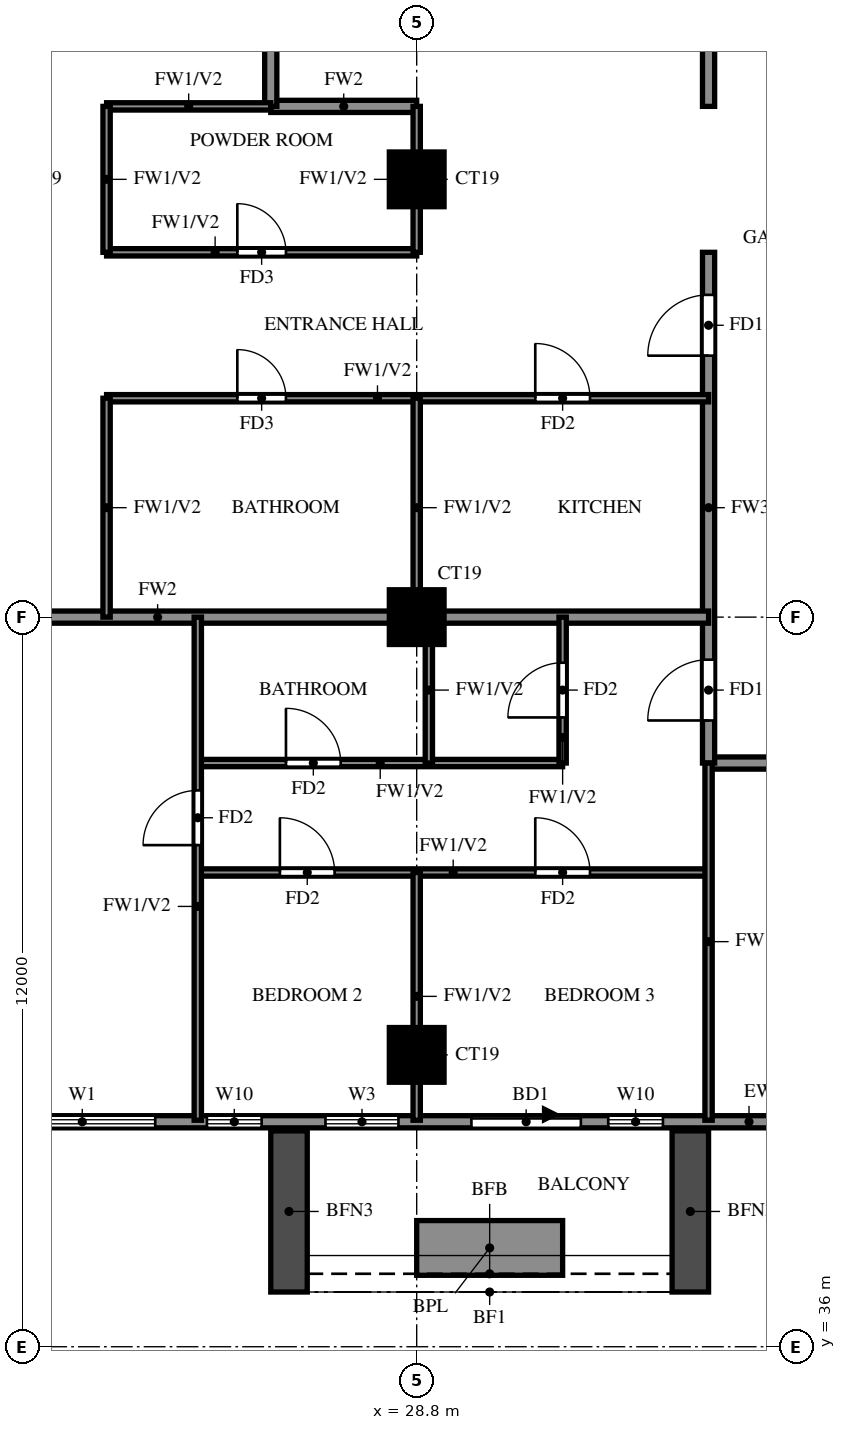
"""IFC4 building model, lengths in metres.
Left out: names, types, materials, properties, quantities, classifications, styles, units other than length and angle.
Written with IfcOpenShell. Run it as: python <this file> out.ifc"""

import sys

from ifc_helpers import new_model, si_unit, direction, frame, frame_2d, origin, origin_2d, place, context, subcontext, project, spatial, rectangle, extrude, source, transform, mapped, element, fill, save


model = new_model("IFC4")
c1 = context("Model", 3, precision=1e-05, world=origin(), true_north=direction((0.0, 1.0)))
c2 = subcontext(c1, "Body", "Model", "MODEL_VIEW")
j1 = project(units=[si_unit("LENGTHUNIT", "METRE"), si_unit("PLANEANGLEUNIT", "RADIAN")], contexts=[c1])
p1 = place(None, origin())
s1 = spatial("IfcSite", under=j1, at=p1, CompositionType="ELEMENT")
p2 = place(p1, origin())
s2 = spatial("IfcBuilding", under=s1, at=p2, CompositionType="ELEMENT")
p3 = place(p2, frame((0.0, 0.0, 181.5)))
s3 = spatial("IfcBuildingStorey", under=s2, at=p3, CompositionType="ELEMENT", Elevation=181.5)
m1 = source(origin(), c2, "Body", "SweptSolid", [
    extrude(rectangle(XDim=0.9, YDim=0.9, at=origin_2d()), origin(), (0.0, 0.0, 1.0), 3.2),
])
for number, where, z_axis, x_axis in (
    (1, (28.8, 40.8, 0.0), (0.0, 0.0, 1.0), (1.0, 0.0, 0.0)),
    (2, (28.8, 48.0, 0.0), (0.0, 0.0, 1.0), (1.0, 0.0, 0.0)),
    (3, (28.8, 55.2, 0.0), (0.0, 0.0, 1.0), (1.0, 0.0, 0.0)),
):
    element("IfcColumn", number, at=place(p3, frame(where, z_axis=z_axis, x_axis=x_axis)), inside=s3, PredefinedType="COLUMN", context=c2, shape_type="MappedRepresentation", body=[
        mapped(m1, transform((0.0, 0.0, 0.0))),
    ])
p4 = place(p3, frame((18.2, 39.7, 0.0), z_axis=(0.0, 0.0, 1.0), x_axis=(1.0, 0.0, 0.0)))
e4 = element("IfcWall", 4, at=p4, inside=s3, PredefinedType="SOLIDWALL", context=c2, shape_type="SweptSolid", body=[
    extrude(rectangle(XDim=23.8, YDim=0.2, at=frame_2d((11.9, 0.0))), origin(), (0.0, 0.0, 1.0), 3.2),
])
p5 = place(p4, frame((11.5, 0.0, 0.0)))
e5 = element("IfcOpeningElement", 5, at=p5, cuts=e4, PredefinedType="OPENING", context=c2, shape_type="SweptSolid", body=[
    extrude(rectangle(XDim=1.8, YDim=2.4, at=frame_2d((0.9, 1.2))), frame((0.0, 0.11, 0.0), z_axis=(0.0, -1.0, 0.0), x_axis=(1.0, 0.0, 0.0)), (0.0, 0.0, 1.0), 0.22),
])
p6 = place(p4, frame((0.9, 0.0, 0.6)))
e6 = element("IfcOpeningElement", 6, at=p6, cuts=e4, PredefinedType="OPENING", context=c2, shape_type="SweptSolid", body=[
    extrude(rectangle(XDim=2.4, YDim=2.4, at=frame_2d((1.2, 1.2))), frame((0.0, 0.11, 0.0), z_axis=(0.0, -1.0, 0.0), x_axis=(1.0, 0.0, 0.0)), (0.0, 0.0, 1.0), 0.22),
])
p7 = place(p4, frame((3.9, 0.0, 0.6)))
e7 = element("IfcOpeningElement", 7, at=p7, cuts=e4, PredefinedType="OPENING", context=c2, shape_type="SweptSolid", body=[
    extrude(rectangle(XDim=2.4, YDim=2.4, at=frame_2d((1.2, 1.2))), frame((0.0, 0.11, 0.0), z_axis=(0.0, -1.0, 0.0), x_axis=(1.0, 0.0, 0.0)), (0.0, 0.0, 1.0), 0.22),
])
p8 = place(p4, frame((7.15, 0.0, 0.6)))
e8 = element("IfcOpeningElement", 8, at=p8, cuts=e4, PredefinedType="OPENING", context=c2, shape_type="SweptSolid", body=[
    extrude(rectangle(XDim=0.9, YDim=2.4, at=frame_2d((0.45, 1.2))), frame((0.0, 0.11, 0.0), z_axis=(0.0, -1.0, 0.0), x_axis=(1.0, 0.0, 0.0)), (0.0, 0.0, 1.0), 0.22),
])
p9 = place(p4, frame((9.1, 0.0, 0.6)))
e9 = element("IfcOpeningElement", 9, at=p9, cuts=e4, PredefinedType="OPENING", context=c2, shape_type="SweptSolid", body=[
    extrude(rectangle(XDim=1.2, YDim=2.4, at=frame_2d((0.6, 1.2))), frame((0.0, 0.11, 0.0), z_axis=(0.0, -1.0, 0.0), x_axis=(1.0, 0.0, 0.0)), (0.0, 0.0, 1.0), 0.22),
])
p10 = place(p4, frame((13.75, 0.0, 0.6)))
e10 = element("IfcOpeningElement", 10, at=p10, cuts=e4, PredefinedType="OPENING", context=c2, shape_type="SweptSolid", body=[
    extrude(rectangle(XDim=0.9, YDim=2.4, at=frame_2d((0.45, 1.2))), frame((0.0, 0.11, 0.0), z_axis=(0.0, -1.0, 0.0), x_axis=(1.0, 0.0, 0.0)), (0.0, 0.0, 1.0), 0.22),
])
for number, where, z_axis, x_axis in (
    (11, (26.7, 39.55, 0.0), (0.0, 0.0, 1.0), (0.0, -1.0, 0.0)),
    (12, (33.3, 39.55, 0.0), (0.0, 0.0, 1.0), (0.0, -1.0, 0.0)),
):
    element("IfcWall", number, at=place(p3, frame(where, z_axis=z_axis, x_axis=x_axis)), inside=s3, PredefinedType="SOLIDWALL", context=c2, shape_type="SweptSolid", body=[
        extrude(rectangle(XDim=2.65, YDim=0.6, at=frame_2d((1.325, 0.0))), origin(), (0.0, 0.0, 1.0), 2.85),
    ])
p11 = place(p3, frame((28.8, 37.625, 0.0), z_axis=(0.0, 0.0, 1.0), x_axis=(1.0, 0.0, 0.0)))
e13 = element("IfcWall", 13, at=p11, inside=s3, PredefinedType="SOLIDWALL", context=c2, shape_type="SweptSolid", body=[
    extrude(rectangle(XDim=2.4, YDim=0.9, at=frame_2d((1.2, 0.0))), origin(), (0.0, 0.0, 1.0), 0.9),
])
p12 = place(p3, frame((33.6, 45.6, 0.0), z_axis=(0.0, 0.0, 1.0), x_axis=(1.0, 0.0, 0.0)))
e14 = element("IfcWall", 14, at=p12, inside=s3, PredefinedType="SOLIDWALL", context=c2, shape_type="SweptSolid", body=[
    extrude(rectangle(XDim=7.2, YDim=0.2, at=frame_2d((3.6, 0.0))), origin(), (0.0, 0.0, 1.0), 3.2),
])
p13 = place(p12, frame((3.15, 0.0, 0.0)))
e15 = element("IfcOpeningElement", 15, at=p13, cuts=e14, PredefinedType="OPENING", context=c2, shape_type="SweptSolid", body=[
    extrude(rectangle(XDim=0.9, YDim=2.1, at=frame_2d((0.45, 1.05))), frame((0.0, 0.11, 0.0), z_axis=(0.0, -1.0, 0.0), x_axis=(1.0, 0.0, 0.0)), (0.0, 0.0, 1.0), 0.22),
])
p14 = place(p3, frame((33.6, 45.6, 0.0), z_axis=(0.0, 0.0, 1.0), x_axis=(0.0, 1.0, 0.0)))
e16 = element("IfcWall", 16, at=p14, inside=s3, PredefinedType="SOLIDWALL", context=c2, shape_type="SweptSolid", body=[
    extrude(rectangle(XDim=8.4, YDim=0.2, at=frame_2d((4.2, 0.0))), origin(), (0.0, 0.0, 1.0), 3.2),
])
p15 = place(p14, frame((0.7, 0.0, 0.0)))
e17 = element("IfcOpeningElement", 17, at=p15, cuts=e16, PredefinedType="OPENING", context=c2, shape_type="SweptSolid", body=[
    extrude(rectangle(XDim=1.0, YDim=2.1, at=frame_2d((0.5, 1.05))), frame((0.0, 0.11, 0.0), z_axis=(0.0, -1.0, 0.0), x_axis=(1.0, 0.0, 0.0)), (0.0, 0.0, 1.0), 0.22),
])
p16 = place(p14, frame((6.7, 0.0, 0.0)))
e18 = element("IfcOpeningElement", 18, at=p16, cuts=e16, PredefinedType="OPENING", context=c2, shape_type="SweptSolid", body=[
    extrude(rectangle(XDim=1.0, YDim=2.1, at=frame_2d((0.5, 1.05))), frame((0.0, 0.11, 0.0), z_axis=(0.0, -1.0, 0.0), x_axis=(1.0, 0.0, 0.0)), (0.0, 0.0, 1.0), 0.22),
])
p17 = place(p3, frame((33.6, 56.4, 0.0), z_axis=(0.0, 0.0, 1.0), x_axis=(0.0, 1.0, 0.0)))
e19 = element("IfcWall", 19, at=p17, inside=s3, PredefinedType="SOLIDWALL", context=c2, shape_type="SweptSolid", body=[
    extrude(rectangle(XDim=6.0, YDim=0.2, at=frame_2d((3.0, 0.0))), origin(), (0.0, 0.0, 1.0), 3.2),
])
p18 = place(p17, frame((3.7, 0.0, 0.0)))
e20 = element("IfcOpeningElement", 20, at=p18, cuts=e19, PredefinedType="OPENING", context=c2, shape_type="SweptSolid", body=[
    extrude(rectangle(XDim=1.0, YDim=2.1, at=frame_2d((0.5, 1.05))), frame((0.0, 0.11, 0.0), z_axis=(0.0, -1.0, 0.0), x_axis=(1.0, 0.0, 0.0)), (0.0, 0.0, 1.0), 0.22),
])
p19 = place(p3, frame((14.525, 48.0, 0.0), z_axis=(0.0, 0.0, 1.0), x_axis=(1.0, 0.0, 0.0)))
e21 = element("IfcWall", 21, at=p19, inside=s3, PredefinedType="SOLIDWALL", context=c2, shape_type="SweptSolid", body=[
    extrude(rectangle(XDim=19.075, YDim=0.2, at=frame_2d((9.538, 0.0))), origin(), (0.0, 0.0, 1.0), 3.2),
])
for number, where, z_axis, x_axis in (
    (22, (26.4, 56.4, 0.0), (0.0, 0.0, 1.0), (1.0, 0.0, 0.0)),
    (23, (26.4, 56.4, 0.0), (0.0, 0.0, 1.0), (0.0, 1.0, 0.0)),
):
    element("IfcWall", number, at=place(p3, frame(where, z_axis=z_axis, x_axis=x_axis)), inside=s3, PredefinedType="SOLIDWALL", context=c2, shape_type="SweptSolid", body=[
        extrude(rectangle(XDim=2.4, YDim=0.2, at=frame_2d((1.2, 0.0))), origin(), (0.0, 0.0, 1.0), 3.2),
    ])
p20 = place(p3, frame((25.2, 43.8, 0.0), z_axis=(0.0, 0.0, 1.0), x_axis=(1.0, 0.0, 0.0)))
e24 = element("IfcWall", 24, at=p20, inside=s3, PredefinedType="PARTITIONING", context=c2, shape_type="SweptSolid", body=[
    extrude(rectangle(XDim=8.4, YDim=0.12, at=frame_2d((4.2, 0.0))), origin(), (0.0, 0.0, 1.0), 3.2),
])
p21 = place(p20, frame((1.35, 0.0, 0.0)))
e25 = element("IfcOpeningElement", 25, at=p21, cuts=e24, PredefinedType="OPENING", context=c2, shape_type="SweptSolid", body=[
    extrude(rectangle(XDim=0.9, YDim=2.1, at=frame_2d((0.45, 1.05))), frame((0.0, 0.07, 0.0), z_axis=(0.0, -1.0, 0.0), x_axis=(1.0, 0.0, 0.0)), (0.0, 0.0, 1.0), 0.14),
])
p22 = place(p20, frame((5.55, 0.0, 0.0)))
e26 = element("IfcOpeningElement", 26, at=p22, cuts=e24, PredefinedType="OPENING", context=c2, shape_type="SweptSolid", body=[
    extrude(rectangle(XDim=0.9, YDim=2.1, at=frame_2d((0.45, 1.05))), frame((0.0, 0.07, 0.0), z_axis=(0.0, -1.0, 0.0), x_axis=(1.0, 0.0, 0.0)), (0.0, 0.0, 1.0), 0.14),
])
p23 = place(p3, frame((25.2, 45.6, 0.0), z_axis=(0.0, 0.0, 1.0), x_axis=(1.0, 0.0, 0.0)))
e27 = element("IfcWall", 27, at=p23, inside=s3, PredefinedType="PARTITIONING", context=c2, shape_type="SweptSolid", body=[
    extrude(rectangle(XDim=6.0, YDim=0.12, at=frame_2d((3.0, 0.0))), origin(), (0.0, 0.0, 1.0), 3.2),
])
p24 = place(p23, frame((1.45, 0.0, 0.0)))
e28 = element("IfcOpeningElement", 28, at=p24, cuts=e27, PredefinedType="OPENING", context=c2, shape_type="SweptSolid", body=[
    extrude(rectangle(XDim=0.9, YDim=2.1, at=frame_2d((0.45, 1.05))), frame((0.0, 0.07, 0.0), z_axis=(0.0, -1.0, 0.0), x_axis=(1.0, 0.0, 0.0)), (0.0, 0.0, 1.0), 0.14),
])
p25 = place(p3, frame((23.7, 51.6, 0.0), z_axis=(0.0, 0.0, 1.0), x_axis=(1.0, 0.0, 0.0)))
e29 = element("IfcWall", 29, at=p25, inside=s3, PredefinedType="PARTITIONING", context=c2, shape_type="SweptSolid", body=[
    extrude(rectangle(XDim=9.9, YDim=0.12, at=frame_2d((4.95, 0.0))), origin(), (0.0, 0.0, 1.0), 3.2),
])
p26 = place(p25, frame((2.15, 0.0, 0.0)))
e30 = element("IfcOpeningElement", 30, at=p26, cuts=e29, PredefinedType="OPENING", context=c2, shape_type="SweptSolid", body=[
    extrude(rectangle(XDim=0.8, YDim=2.1, at=frame_2d((0.4, 1.05))), frame((0.0, 0.07, 0.0), z_axis=(0.0, -1.0, 0.0), x_axis=(1.0, 0.0, 0.0)), (0.0, 0.0, 1.0), 0.14),
])
p27 = place(p25, frame((7.05, 0.0, 0.0)))
e31 = element("IfcOpeningElement", 31, at=p27, cuts=e29, PredefinedType="OPENING", context=c2, shape_type="SweptSolid", body=[
    extrude(rectangle(XDim=0.9, YDim=2.1, at=frame_2d((0.45, 1.05))), frame((0.0, 0.07, 0.0), z_axis=(0.0, -1.0, 0.0), x_axis=(1.0, 0.0, 0.0)), (0.0, 0.0, 1.0), 0.14),
])
p28 = place(p3, frame((23.7, 54.0, 0.0), z_axis=(0.0, 0.0, 1.0), x_axis=(1.0, 0.0, 0.0)))
e32 = element("IfcWall", 32, at=p28, inside=s3, PredefinedType="PARTITIONING", context=c2, shape_type="SweptSolid", body=[
    extrude(rectangle(XDim=5.1, YDim=0.12, at=frame_2d((2.55, 0.0))), origin(), (0.0, 0.0, 1.0), 3.2),
])
p29 = place(p28, frame((2.15, 0.0, 0.0)))
e33 = element("IfcOpeningElement", 33, at=p29, cuts=e32, PredefinedType="OPENING", context=c2, shape_type="SweptSolid", body=[
    extrude(rectangle(XDim=0.8, YDim=2.1, at=frame_2d((0.4, 1.05))), frame((0.0, 0.07, 0.0), z_axis=(0.0, -1.0, 0.0), x_axis=(1.0, 0.0, 0.0)), (0.0, 0.0, 1.0), 0.14),
])
p30 = place(p3, frame((23.7, 56.4, 0.0), z_axis=(0.0, 0.0, 1.0), x_axis=(1.0, 0.0, 0.0)))
e34 = element("IfcWall", 34, at=p30, inside=s3, PredefinedType="PARTITIONING", context=c2, shape_type="SweptSolid", body=[
    extrude(rectangle(XDim=2.7, YDim=0.12, at=frame_2d((1.35, 0.0))), origin(), (0.0, 0.0, 1.0), 3.2),
])
p31 = place(p3, frame((23.7, 48.0, 0.0), z_axis=(0.0, 0.0, 1.0), x_axis=(0.0, 1.0, 0.0)))
e35 = element("IfcWall", 35, at=p31, inside=s3, PredefinedType="PARTITIONING", context=c2, shape_type="SweptSolid", body=[
    extrude(rectangle(XDim=3.6, YDim=0.12, at=frame_2d((1.8, 0.0))), origin(), (0.0, 0.0, 1.0), 3.2),
])
p32 = place(p3, frame((23.7, 54.0, 0.0), z_axis=(0.0, 0.0, 1.0), x_axis=(0.0, 1.0, 0.0)))
e36 = element("IfcWall", 36, at=p32, inside=s3, PredefinedType="PARTITIONING", context=c2, shape_type="SweptSolid", body=[
    extrude(rectangle(XDim=2.4, YDim=0.12, at=frame_2d((1.2, 0.0))), origin(), (0.0, 0.0, 1.0), 3.2),
])
p33 = place(p3, frame((25.2, 39.725, 0.0), z_axis=(0.0, 0.0, 1.0), x_axis=(0.0, 1.0, 0.0)))
e37 = element("IfcWall", 37, at=p33, inside=s3, PredefinedType="PARTITIONING", context=c2, shape_type="SweptSolid", body=[
    extrude(rectangle(XDim=8.275, YDim=0.12, at=frame_2d((4.137, 0.0))), origin(), (0.0, 0.0, 1.0), 3.2),
])
p34 = place(p33, frame((4.525, 0.0, 0.0)))
e38 = element("IfcOpeningElement", 38, at=p34, cuts=e37, PredefinedType="OPENING", context=c2, shape_type="SweptSolid", body=[
    extrude(rectangle(XDim=0.9, YDim=2.1, at=frame_2d((0.45, 1.05))), frame((0.0, 0.07, 0.0), z_axis=(0.0, -1.0, 0.0), x_axis=(1.0, 0.0, 0.0)), (0.0, 0.0, 1.0), 0.14),
])
p35 = place(p3, frame((28.8, 39.725, 0.0), z_axis=(0.0, 0.0, 1.0), x_axis=(0.0, 1.0, 0.0)))
e39 = element("IfcWall", 39, at=p35, inside=s3, PredefinedType="PARTITIONING", context=c2, shape_type="SweptSolid", body=[
    extrude(rectangle(XDim=4.075, YDim=0.12, at=frame_2d((2.038, 0.0))), origin(), (0.0, 0.0, 1.0), 3.2),
])
p36 = place(p3, frame((28.8, 48.0, 0.0), z_axis=(0.0, 0.0, 1.0), x_axis=(0.0, 1.0, 0.0)))
e40 = element("IfcWall", 40, at=p36, inside=s3, PredefinedType="PARTITIONING", context=c2, shape_type="SweptSolid", body=[
    extrude(rectangle(XDim=3.6, YDim=0.12, at=frame_2d((1.8, 0.0))), origin(), (0.0, 0.0, 1.0), 3.2),
])
for number, where, z_axis, x_axis in (
    (41, (28.8, 54.0, 0.0), (0.0, 0.0, 1.0), (0.0, 1.0, 0.0)),
    (42, (29.0, 45.6, 0.0), (0.0, 0.0, 1.0), (0.0, 1.0, 0.0)),
):
    element("IfcWall", number, at=place(p3, frame(where, z_axis=z_axis, x_axis=x_axis)), inside=s3, PredefinedType="PARTITIONING", context=c2, shape_type="SweptSolid", body=[
        extrude(rectangle(XDim=2.4, YDim=0.12, at=frame_2d((1.2, 0.0))), origin(), (0.0, 0.0, 1.0), 3.2),
    ])
p37 = place(p3, frame((31.2, 45.6, 0.0), z_axis=(0.0, 0.0, 1.0), x_axis=(0.0, 1.0, 0.0)))
e43 = element("IfcWall", 43, at=p37, inside=s3, PredefinedType="PARTITIONING", context=c2, shape_type="SweptSolid", body=[
    extrude(rectangle(XDim=2.4, YDim=0.12, at=frame_2d((1.2, 0.0))), origin(), (0.0, 0.0, 1.0), 3.2),
])
p38 = place(p37, frame((0.75, 0.0, 0.0)))
e44 = element("IfcOpeningElement", 44, at=p38, cuts=e43, PredefinedType="OPENING", context=c2, shape_type="SweptSolid", body=[
    extrude(rectangle(XDim=0.9, YDim=2.1, at=frame_2d((0.45, 1.05))), frame((0.0, 0.07, 0.0), z_axis=(0.0, -1.0, 0.0), x_axis=(1.0, 0.0, 0.0)), (0.0, 0.0, 1.0), 0.14),
])
p39 = place(p3, frame((33.6, 39.725, 0.0), z_axis=(0.0, 0.0, 1.0), x_axis=(0.0, 1.0, 0.0)))
e45 = element("IfcWall", 45, at=p39, inside=s3, PredefinedType="PARTITIONING", context=c2, shape_type="SweptSolid", body=[
    extrude(rectangle(XDim=5.875, YDim=0.12, at=frame_2d((2.938, 0.0))), origin(), (0.0, 0.0, 1.0), 3.2),
])
p40 = place(p5, origin())
e46 = element("IfcDoor", 46, at=p40, inside=s3, OperationType="DOUBLE_DOOR_SLIDING", PredefinedType="DOOR", context=c2, shape_type="SweptSolid", body=[
    extrude(rectangle(XDim=1.8, YDim=2.4, at=frame_2d((0.9, 1.2))), frame((0.0, 0.025, 0.0), z_axis=(0.0, -1.0, 0.0), x_axis=(1.0, 0.0, 0.0)), (0.0, 0.0, 1.0), 0.05),
])
fill(e5, e46)
p41 = place(p7, origin())
e47 = element("IfcWindow", 47, at=p41, inside=s3, PartitioningType="DOUBLE_PANEL_VERTICAL", PredefinedType="WINDOW", context=c2, shape_type="SweptSolid", body=[
    extrude(rectangle(XDim=2.4, YDim=2.4, at=frame_2d((1.2, 1.2))), frame((0.0, 0.03, 0.0), z_axis=(0.0, -1.0, 0.0), x_axis=(1.0, 0.0, 0.0)), (0.0, 0.0, 1.0), 0.06),
])
fill(e7, e47)
p42 = place(p8, origin())
e48 = element("IfcWindow", 48, at=p42, inside=s3, PartitioningType="SINGLE_PANEL", PredefinedType="WINDOW", context=c2, shape_type="SweptSolid", body=[
    extrude(rectangle(XDim=0.9, YDim=2.4, at=frame_2d((0.45, 1.2))), frame((0.0, 0.03, 0.0), z_axis=(0.0, -1.0, 0.0), x_axis=(1.0, 0.0, 0.0)), (0.0, 0.0, 1.0), 0.06),
])
fill(e8, e48)
p43 = place(p9, origin())
e49 = element("IfcWindow", 49, at=p43, inside=s3, PartitioningType="SINGLE_PANEL", PredefinedType="WINDOW", context=c2, shape_type="SweptSolid", body=[
    extrude(rectangle(XDim=1.2, YDim=2.4, at=frame_2d((0.6, 1.2))), frame((0.0, 0.03, 0.0), z_axis=(0.0, -1.0, 0.0), x_axis=(1.0, 0.0, 0.0)), (0.0, 0.0, 1.0), 0.06),
])
fill(e9, e49)
p44 = place(p10, origin())
e50 = element("IfcWindow", 50, at=p44, inside=s3, PartitioningType="SINGLE_PANEL", PredefinedType="WINDOW", context=c2, shape_type="SweptSolid", body=[
    extrude(rectangle(XDim=0.9, YDim=2.4, at=frame_2d((0.45, 1.2))), frame((0.0, 0.03, 0.0), z_axis=(0.0, -1.0, 0.0), x_axis=(1.0, 0.0, 0.0)), (0.0, 0.0, 1.0), 0.06),
])
fill(e10, e50)
p45 = place(p15, origin())
e51 = element("IfcDoor", 51, at=p45, inside=s3, OperationType="SINGLE_SWING_RIGHT", PredefinedType="DOOR", context=c2, shape_type="SweptSolid", body=[
    extrude(rectangle(XDim=1.0, YDim=2.1, at=frame_2d((0.5, 1.05))), frame((0.0, 0.025, 0.0), z_axis=(0.0, -1.0, 0.0), x_axis=(1.0, 0.0, 0.0)), (0.0, 0.0, 1.0), 0.05),
])
fill(e17, e51)
p46 = place(p34, origin())
e52 = element("IfcDoor", 52, at=p46, inside=s3, OperationType="SINGLE_SWING_LEFT", PredefinedType="DOOR", context=c2, shape_type="SweptSolid", body=[
    extrude(rectangle(XDim=0.9, YDim=2.1, at=frame_2d((0.45, 1.05))), frame((0.0, 0.025, 0.0), z_axis=(0.0, -1.0, 0.0), x_axis=(1.0, 0.0, 0.0)), (0.0, 0.0, 1.0), 0.05),
])
fill(e38, e52)
p47 = place(p21, origin())
e53 = element("IfcDoor", 53, at=p47, inside=s3, OperationType="SINGLE_SWING_LEFT", PredefinedType="DOOR", context=c2, shape_type="SweptSolid", body=[
    extrude(rectangle(XDim=0.9, YDim=2.1, at=frame_2d((0.45, 1.05))), frame((0.0, 0.025, 0.0), z_axis=(0.0, -1.0, 0.0), x_axis=(1.0, 0.0, 0.0)), (0.0, 0.0, 1.0), 0.05),
])
fill(e25, e53)
p48 = place(p22, origin())
e54 = element("IfcDoor", 54, at=p48, inside=s3, OperationType="SINGLE_SWING_RIGHT", PredefinedType="DOOR", context=c2, shape_type="SweptSolid", body=[
    extrude(rectangle(XDim=0.9, YDim=2.1, at=frame_2d((0.45, 1.05))), frame((0.0, 0.025, 0.0), z_axis=(0.0, -1.0, 0.0), x_axis=(1.0, 0.0, 0.0)), (0.0, 0.0, 1.0), 0.05),
])
fill(e26, e54)
p49 = place(p24, origin())
e55 = element("IfcDoor", 55, at=p49, inside=s3, OperationType="SINGLE_SWING_LEFT", PredefinedType="DOOR", context=c2, shape_type="SweptSolid", body=[
    extrude(rectangle(XDim=0.9, YDim=2.1, at=frame_2d((0.45, 1.05))), frame((0.0, 0.025, 0.0), z_axis=(0.0, -1.0, 0.0), x_axis=(1.0, 0.0, 0.0)), (0.0, 0.0, 1.0), 0.05),
])
fill(e28, e55)
p50 = place(p38, origin())
e56 = element("IfcDoor", 56, at=p50, inside=s3, OperationType="SINGLE_SWING_LEFT", PredefinedType="DOOR", context=c2, shape_type="SweptSolid", body=[
    extrude(rectangle(XDim=0.9, YDim=2.1, at=frame_2d((0.45, 1.05))), frame((0.0, 0.025, 0.0), z_axis=(0.0, -1.0, 0.0), x_axis=(1.0, 0.0, 0.0)), (0.0, 0.0, 1.0), 0.05),
])
fill(e44, e56)
p51 = place(p16, origin())
e57 = element("IfcDoor", 57, at=p51, inside=s3, OperationType="SINGLE_SWING_LEFT", PredefinedType="DOOR", context=c2, shape_type="SweptSolid", body=[
    extrude(rectangle(XDim=1.0, YDim=2.1, at=frame_2d((0.5, 1.05))), frame((0.0, 0.025, 0.0), z_axis=(0.0, -1.0, 0.0), x_axis=(1.0, 0.0, 0.0)), (0.0, 0.0, 1.0), 0.05),
])
fill(e18, e57)
p52 = place(p26, origin())
e58 = element("IfcDoor", 58, at=p52, inside=s3, OperationType="SINGLE_SWING_LEFT", PredefinedType="DOOR", context=c2, shape_type="SweptSolid", body=[
    extrude(rectangle(XDim=0.8, YDim=2.1, at=frame_2d((0.4, 1.05))), frame((0.0, 0.025, 0.0), z_axis=(0.0, -1.0, 0.0), x_axis=(1.0, 0.0, 0.0)), (0.0, 0.0, 1.0), 0.05),
])
fill(e30, e58)
p53 = place(p29, origin())
e59 = element("IfcDoor", 59, at=p53, inside=s3, OperationType="SINGLE_SWING_LEFT", PredefinedType="DOOR", context=c2, shape_type="SweptSolid", body=[
    extrude(rectangle(XDim=0.8, YDim=2.1, at=frame_2d((0.4, 1.05))), frame((0.0, 0.025, 0.0), z_axis=(0.0, -1.0, 0.0), x_axis=(1.0, 0.0, 0.0)), (0.0, 0.0, 1.0), 0.05),
])
fill(e33, e59)
p54 = place(p27, origin())
e60 = element("IfcDoor", 60, at=p54, inside=s3, OperationType="SINGLE_SWING_RIGHT", PredefinedType="DOOR", context=c2, shape_type="SweptSolid", body=[
    extrude(rectangle(XDim=0.9, YDim=2.1, at=frame_2d((0.45, 1.05))), frame((0.0, 0.025, 0.0), z_axis=(0.0, -1.0, 0.0), x_axis=(1.0, 0.0, 0.0)), (0.0, 0.0, 1.0), 0.05),
])
fill(e31, e60)
save(model, sys.argv[1])
